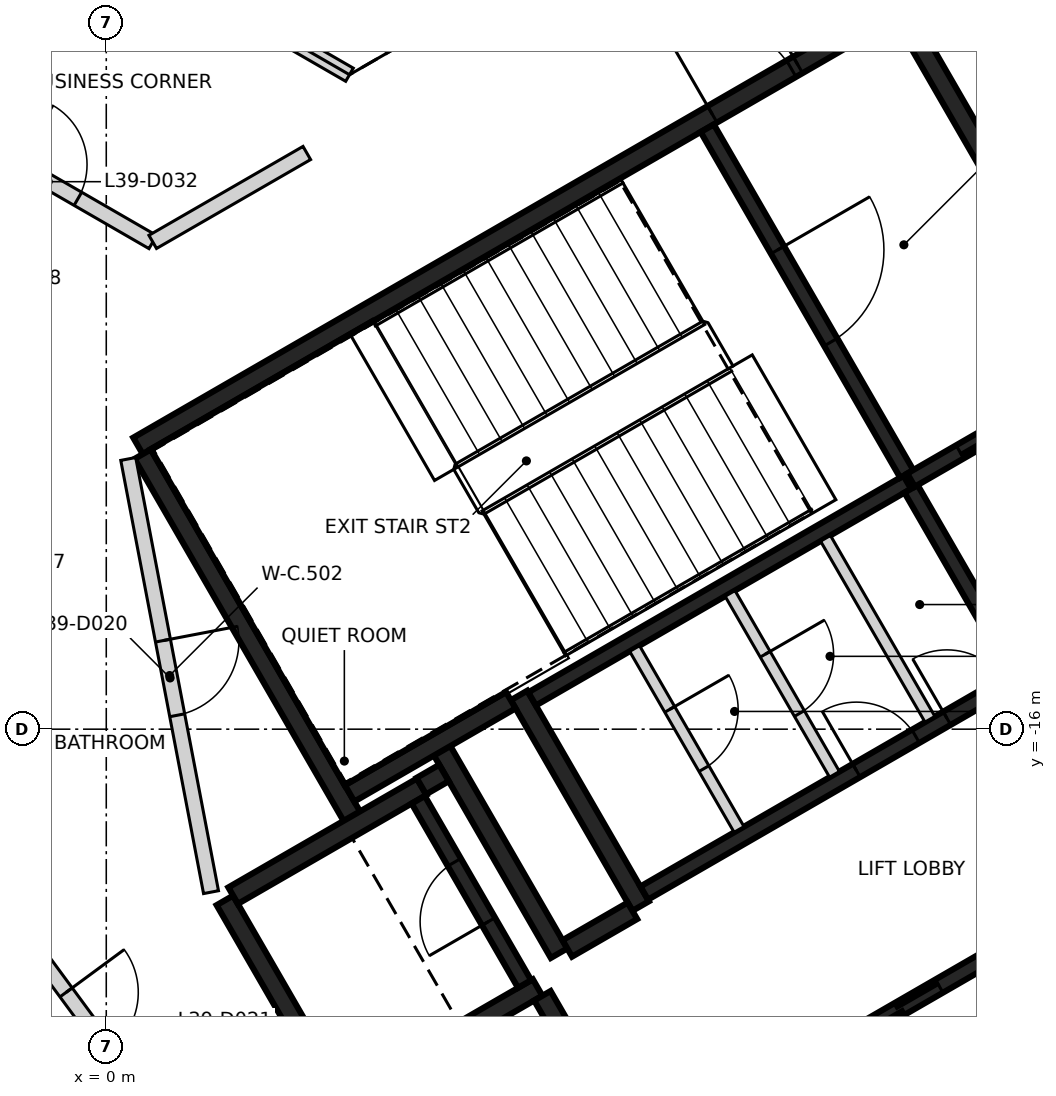
"""IFC4 building model, lengths in metres.
Left out: names, types, materials, properties, quantities, classifications, styles, units other than length and angle.
Written with IfcOpenShell. Run it as: python <this file> out.ifc"""

import sys

from ifc_helpers import new_model, si_unit, direction, frame, frame_2d, origin, place, context, subcontext, project, spatial, rectangle, extrude, element, fill, save


model = new_model("IFC4")
c1 = context("Model", 3, precision=1e-05, world=origin(), true_north=direction((0.0, 1.0)))
c2 = subcontext(c1, "Body", "Model", "MODEL_VIEW")
j1 = project(units=[si_unit("LENGTHUNIT", "METRE"), si_unit("PLANEANGLEUNIT", "RADIAN")], contexts=[c1])
p1 = place(None, origin())
s1 = spatial("IfcSite", under=j1, at=p1, CompositionType="ELEMENT")
p2 = place(p1, origin())
s2 = spatial("IfcBuilding", under=s1, at=p2, CompositionType="ELEMENT")
p3 = place(p2, frame((0.0, 0.0, 157.6)))
s3 = spatial("IfcBuildingStorey", under=s2, at=p3, CompositionType="ELEMENT", Elevation=157.6)
p4 = place(p3, frame((0.417, -12.273, 0.0), z_axis=(0.0, 0.0, 1.0), x_axis=(0.866021906294, 0.500006057782, 0.0)))
e1 = element("IfcWall", 1, at=p4, inside=s3, PredefinedType="SHEAR", context=c2, shape_type="SweptSolid", body=[
    extrude(rectangle(XDim=11.55, YDim=0.25, at=frame_2d((5.775, 0.0))), origin(), (0.0, 0.0, 1.0), 3.2),
])
p5 = place(p4, frame((10.025, 0.0, 0.0)))
e2 = element("IfcOpeningElement", 2, at=p5, cuts=e1, PredefinedType="OPENING", context=c2, shape_type="SweptSolid", body=[
    extrude(rectangle(XDim=1.2, YDim=2.1, at=frame_2d((0.6, 1.05))), frame((0.0, 0.135, 0.0), z_axis=(0.0, -1.0, 0.0), x_axis=(1.0, 0.0, 0.0)), (0.0, 0.0, 1.0), 0.27),
])
p6 = place(p4, frame((8.725, 0.0, 0.0)))
e3 = element("IfcOpeningElement", 3, at=p6, cuts=e1, PredefinedType="OPENING", context=c2, shape_type="SweptSolid", body=[
    extrude(rectangle(XDim=1.2, YDim=2.1, at=frame_2d((0.6, 1.05))), frame((0.0, 0.135, 0.0), z_axis=(0.0, -1.0, 0.0), x_axis=(1.0, 0.0, 0.0)), (0.0, 0.0, 1.0), 0.27),
])
p7 = place(p3, frame((3.235, -17.153, 0.0), z_axis=(0.0, 0.0, 1.0), x_axis=(-0.500008851346, 0.866020293397, 0.0)))
e4 = element("IfcWall", 4, at=p7, inside=s3, PredefinedType="SHEAR", context=c2, shape_type="SweptSolid", body=[
    extrude(rectangle(XDim=5.51, YDim=0.25, at=frame_2d((2.755, 0.0))), origin(), (0.0, 0.0, 1.0), 3.2),
])
p8 = place(p3, frame((10.483, -6.606, 0.0), z_axis=(0.0, 0.0, 1.0), x_axis=(0.49999885962, -0.866026062182, 0.0)))
e5 = element("IfcWall", 5, at=p8, inside=s3, PredefinedType="SHEAR", context=c2, shape_type="SweptSolid", body=[
    extrude(rectangle(XDim=5.225, YDim=0.25, at=frame_2d((2.612, 0.0))), origin(), (0.0, 0.0, 1.0), 3.2),
])
p9 = place(p3, frame((7.031, -18.327, 0.0), z_axis=(0.0, 0.0, 1.0), x_axis=(-0.499971222258, 0.866042017984, 0.0)))
e6 = element("IfcWall", 6, at=p9, inside=s3, PredefinedType="SHEAR", context=c2, shape_type="SweptSolid", body=[
    extrude(rectangle(XDim=3.2, YDim=0.25, at=frame_2d((1.6, 0.0))), origin(), (0.0, 0.0, 1.0), 3.2),
])
p10 = place(p3, frame((3.085, -20.894, 0.0), z_axis=(0.0, 0.0, 1.0), x_axis=(-0.499978833458, 0.866037623948, 0.0)))
e7 = element("IfcWall", 7, at=p10, inside=s3, PredefinedType="SHEAR", context=c2, shape_type="SweptSolid", body=[
    extrude(rectangle(XDim=3.05, YDim=0.25, at=frame_2d((1.525, 0.0))), origin(), (0.0, 0.0, 1.0), 3.2),
])
p11 = place(p3, frame((1.669, -18.19, 0.0), z_axis=(0.0, 0.0, 1.0), x_axis=(0.866042235819, 0.499970844928, 0.0)))
e8 = element("IfcWall", 8, at=p11, inside=s3, PredefinedType="SHEAR", context=c2, shape_type="SweptSolid", body=[
    extrude(rectangle(XDim=2.865, YDim=0.25, at=frame_2d((1.432, 0.0))), origin(), (0.0, 0.0, 1.0), 3.2),
])
p12 = place(p3, frame((5.675, -19.399, 0.0), z_axis=(0.0, 0.0, 1.0), x_axis=(-0.866026637627, -0.499997862916, 0.0)))
e9 = element("IfcWall", 9, at=p12, inside=s3, PredefinedType="SHEAR", context=c2, shape_type="SweptSolid", body=[
    extrude(rectangle(XDim=2.865, YDim=0.25, at=frame_2d((1.432, 0.0))), origin(), (0.0, 0.0, 1.0), 3.2),
])
p13 = place(p3, frame((4.414, -16.276, 0.0), z_axis=(0.0, 0.0, 1.0), x_axis=(0.500003324108, -0.866023484601, 0.0)))
e10 = element("IfcWall", 10, at=p13, inside=s3, PredefinedType="SHEAR", context=c2, shape_type="SweptSolid", body=[
    extrude(rectangle(XDim=3.085, YDim=0.25, at=frame_2d((1.542, 0.0))), origin(), (0.0, 0.0, 1.0), 3.2),
])
p14 = place(p3, frame((5.322, -15.619, 0.0), z_axis=(0.0, 0.0, 1.0), x_axis=(-0.866026229868, -0.499998569178, 0.0)))
e11 = element("IfcWall", 11, at=p14, inside=s3, PredefinedType="SHEAR", context=c2, shape_type="SweptSolid", body=[
    extrude(rectangle(XDim=2.449, YDim=0.25, at=frame_2d((1.225, 0.0))), origin(), (0.0, 0.0, 1.0), 3.2),
])
p15 = place(p3, frame((6.065, -18.885, 0.0), z_axis=(0.0, 0.0, 1.0), x_axis=(0.866017078145, 0.500014420154, 0.0)))
e12 = element("IfcWall", 12, at=p15, inside=s3, PredefinedType="SHEAR", context=c2, shape_type="SweptSolid", body=[
    extrude(rectangle(XDim=0.989, YDim=0.25, at=frame_2d((0.495, 0.0))), origin(), (0.0, 0.0, 1.0), 3.2),
])
p16 = place(p3, frame((6.08, -20.1, 0.0), z_axis=(0.0, 0.0, 1.0), x_axis=(-0.500051773299, 0.865995510393, 0.0)))
e13 = element("IfcWall", 13, at=p16, inside=s3, PredefinedType="SHEAR", context=c2, shape_type="SweptSolid", body=[
    extrude(rectangle(XDim=0.685, YDim=0.25, at=frame_2d((0.342, 0.0))), origin(), (0.0, 0.0, 1.0), 3.2),
])
p17 = place(p3, frame((4.145, -16.749, 0.0), z_axis=(0.0, 0.0, 1.0), x_axis=(0.866185586049, 0.49972245349, 0.0)))
e14 = element("IfcWall", 14, at=p17, inside=s3, PredefinedType="SHEAR", context=c2, shape_type="SweptSolid", body=[
    extrude(rectangle(XDim=0.344, YDim=0.25, at=frame_2d((0.172, 0.0))), origin(), (0.0, 0.0, 1.0), 3.2),
])
p18 = place(p3, frame((9.052, -20.48, 0.0), z_axis=(0.0, 0.0, 1.0), x_axis=(0.866030299012, 0.499991521122, 0.0)))
e15 = element("IfcWall", 15, at=p18, inside=s3, PredefinedType="SHEAR", context=c2, shape_type="SweptSolid", body=[
    extrude(rectangle(XDim=6.1, YDim=0.2, at=frame_2d((3.05, 0.0))), origin(), (0.0, 0.0, 1.0), 3.2),
])
p19 = place(p18, frame((1.0, 0.0, 0.0)))
e16 = element("IfcOpeningElement", 16, at=p19, cuts=e15, PredefinedType="OPENING", context=c2, shape_type="SweptSolid", body=[
    extrude(rectangle(XDim=1.2, YDim=2.1, at=frame_2d((0.6, 1.05))), frame((0.0, 0.11, 0.0), z_axis=(0.0, -1.0, 0.0), x_axis=(1.0, 0.0, 0.0)), (0.0, 0.0, 1.0), 0.22),
])
p20 = place(p18, frame((4.05, 0.0, 0.0)))
e17 = element("IfcOpeningElement", 17, at=p20, cuts=e15, PredefinedType="OPENING", context=c2, shape_type="SweptSolid", body=[
    extrude(rectangle(XDim=1.2, YDim=2.1, at=frame_2d((0.6, 1.05))), frame((0.0, 0.11, 0.0), z_axis=(0.0, -1.0, 0.0), x_axis=(1.0, 0.0, 0.0)), (0.0, 0.0, 1.0), 0.22),
])
p21 = place(p3, frame((10.538, -12.752, 0.0), z_axis=(0.0, 0.0, 1.0), x_axis=(-0.866038630372, -0.499977090179, 0.0)))
e18 = element("IfcWall", 18, at=p21, inside=s3, PredefinedType="SHEAR", context=c2, shape_type="SweptSolid", body=[
    extrude(rectangle(XDim=5.699, YDim=0.2, at=frame_2d((2.85, 0.0))), origin(), (0.0, 0.0, 1.0), 3.2),
])
p22 = place(p3, frame((7.077, -18.156, 0.0), z_axis=(0.0, 0.0, 1.0), x_axis=(0.866038630372, 0.499977090179, 0.0)))
e19 = element("IfcWall", 19, at=p22, inside=s3, PredefinedType="SHEAR", context=c2, shape_type="SweptSolid", body=[
    extrude(rectangle(XDim=5.699, YDim=0.2, at=frame_2d((2.85, 0.0))), origin(), (0.0, 0.0, 1.0), 3.2),
])
p23 = place(p22, frame((3.224, 0.0, 0.0)))
e20 = element("IfcOpeningElement", 20, at=p23, cuts=e19, PredefinedType="OPENING", context=c2, shape_type="SweptSolid", body=[
    extrude(rectangle(XDim=0.9, YDim=2.1, at=frame_2d((0.45, 1.05))), frame((0.0, 0.11, 0.0), z_axis=(0.0, -1.0, 0.0), x_axis=(1.0, 0.0, 0.0)), (0.0, 0.0, 1.0), 0.22),
])
p24 = place(p22, frame((4.599, 0.0, 0.0)))
e21 = element("IfcOpeningElement", 21, at=p24, cuts=e19, PredefinedType="OPENING", context=c2, shape_type="SweptSolid", body=[
    extrude(rectangle(XDim=0.9, YDim=2.1, at=frame_2d((0.45, 1.05))), frame((0.0, 0.11, 0.0), z_axis=(0.0, -1.0, 0.0), x_axis=(1.0, 0.0, 0.0)), (0.0, 0.0, 1.0), 0.22),
])
p25 = place(p3, frame((7.906, -8.094, 0.0), z_axis=(0.0, 0.0, 1.0), x_axis=(0.500024287448, -0.866011380966, 0.0)))
e22 = element("IfcWall", 22, at=p25, inside=s3, PredefinedType="SHEAR", context=c2, shape_type="SweptSolid", body=[
    extrude(rectangle(XDim=5.251, YDim=0.2, at=frame_2d((2.625, 0.0))), origin(), (0.0, 0.0, 1.0), 3.2),
])
p26 = place(p25, frame((1.849, 0.0, 0.0)))
e23 = element("IfcOpeningElement", 23, at=p26, cuts=e22, PredefinedType="OPENING", context=c2, shape_type="SweptSolid", body=[
    extrude(rectangle(XDim=1.4, YDim=2.1, at=frame_2d((0.7, 1.05))), frame((0.0, 0.11, 0.0), z_axis=(0.0, -1.0, 0.0), x_axis=(1.0, 0.0, 0.0)), (0.0, 0.0, 1.0), 0.22),
])
p27 = place(p3, frame((5.503, -19.352, 0.0), z_axis=(0.0, 0.0, 1.0), x_axis=(-0.499986818241, 0.866033014143, 0.0)))
e24 = element("IfcWall", 24, at=p27, inside=s3, PredefinedType="SHEAR", context=c2, shape_type="SweptSolid", body=[
    extrude(rectangle(XDim=2.798, YDim=0.2, at=frame_2d((1.399, 0.0))), origin(), (0.0, 0.0, 1.0), 3.2),
])
p28 = place(p27, frame((0.949, 0.0, 0.0)))
e25 = element("IfcOpeningElement", 25, at=p28, cuts=e24, PredefinedType="OPENING", context=c2, shape_type="SweptSolid", body=[
    extrude(rectangle(XDim=0.9, YDim=2.1, at=frame_2d((0.45, 1.05))), frame((0.0, 0.11, 0.0), z_axis=(0.0, -1.0, 0.0), x_axis=(1.0, 0.0, 0.0)), (0.0, 0.0, 1.0), 0.22),
])
p29 = place(p3, frame((11.963, -15.22, 0.0), z_axis=(0.0, 0.0, 1.0), x_axis=(-0.500034990121, 0.866005201286, 0.0)))
e26 = element("IfcWall", 26, at=p29, inside=s3, PredefinedType="SHEAR", context=c2, shape_type="SweptSolid", body=[
    extrude(rectangle(XDim=2.75, YDim=0.2, at=frame_2d((1.375, 0.0))), origin(), (0.0, 0.0, 1.0), 3.2),
])
p30 = place(p3, frame((10.587, -12.723, 0.0), z_axis=(0.0, 0.0, 1.0), x_axis=(0.866037306777, 0.499979382845, 0.0)))
e27 = element("IfcWall", 27, at=p30, inside=s3, PredefinedType="SHEAR", context=c2, shape_type="SweptSolid", body=[
    extrude(rectangle(XDim=2.742, YDim=0.2, at=frame_2d((1.371, 0.0))), origin(), (0.0, 0.0, 1.0), 3.2),
])
p31 = place(p30, frame((0.743, 0.0, 0.0)))
e28 = element("IfcOpeningElement", 28, at=p31, cuts=e27, PredefinedType="OPENING", context=c2, shape_type="SweptSolid", body=[
    extrude(rectangle(XDim=1.3, YDim=2.1, at=frame_2d((0.65, 1.05))), frame((0.0, 0.11, 0.0), z_axis=(0.0, -1.0, 0.0), x_axis=(1.0, 0.0, 0.0)), (0.0, 0.0, 1.0), 0.22),
])
p32 = place(p3, frame((8.207, -14.214, 0.0), z_axis=(0.0, 0.0, 1.0), x_axis=(0.50002746344, -0.86600954718, 0.0)))
e29 = element("IfcWall", 29, at=p32, inside=s3, PredefinedType="PARTITIONING", context=c2, shape_type="SweptSolid", body=[
    extrude(rectangle(XDim=2.748, YDim=0.15, at=frame_2d((1.374, 0.0))), origin(), (0.0, 0.0, 1.0), 3.2),
])
p33 = place(p32, frame((0.924, 0.0, 0.0)))
e30 = element("IfcOpeningElement", 30, at=p33, cuts=e29, PredefinedType="OPENING", context=c2, shape_type="SweptSolid", body=[
    extrude(rectangle(XDim=0.9, YDim=2.1, at=frame_2d((0.45, 1.05))), frame((0.0, 0.085, 0.0), z_axis=(0.0, -1.0, 0.0), x_axis=(1.0, 0.0, 0.0)), (0.0, 0.0, 1.0), 0.17),
])
p34 = place(p3, frame((9.462, -13.489, 0.0), z_axis=(0.0, 0.0, 1.0), x_axis=(0.499988999718, -0.866031754707, 0.0)))
e31 = element("IfcWall", 31, at=p34, inside=s3, PredefinedType="PARTITIONING", context=c2, shape_type="SweptSolid", body=[
    extrude(rectangle(XDim=2.749, YDim=0.15, at=frame_2d((1.374, 0.0))), origin(), (0.0, 0.0, 1.0), 3.2),
])
p35 = place(p3, frame((6.951, -14.939, 0.0), z_axis=(0.0, 0.0, 1.0), x_axis=(0.499988999718, -0.866031754707, 0.0)))
e32 = element("IfcWall", 32, at=p35, inside=s3, PredefinedType="PARTITIONING", context=c2, shape_type="SweptSolid", body=[
    extrude(rectangle(XDim=2.749, YDim=0.15, at=frame_2d((1.374, 0.0))), origin(), (0.0, 0.0, 1.0), 3.2),
])
p36 = place(p35, frame((0.924, 0.0, 0.0)))
e33 = element("IfcOpeningElement", 33, at=p36, cuts=e32, PredefinedType="OPENING", context=c2, shape_type="SweptSolid", body=[
    extrude(rectangle(XDim=0.9, YDim=2.1, at=frame_2d((0.45, 1.05))), frame((0.0, 0.085, 0.0), z_axis=(0.0, -1.0, 0.0), x_axis=(1.0, 0.0, 0.0)), (0.0, 0.0, 1.0), 0.17),
])
p37 = place(p3, frame((-8.612, -4.265, 0.0), z_axis=(0.0, 0.0, 1.0), x_axis=(0.865984415152, -0.500070987675, 0.0)))
e34 = element("IfcWall", 34, at=p37, inside=s3, PredefinedType="PARTITIONING", context=c2, shape_type="SweptSolid", body=[
    extrude(rectangle(XDim=10.651, YDim=0.2, at=frame_2d((5.326, 0.0))), origin(), (0.0, 0.0, 1.0), 3.2),
])
p38 = place(p37, frame((1.138, 0.0, 0.0)))
e35 = element("IfcOpeningElement", 35, at=p38, cuts=e34, PredefinedType="OPENING", context=c2, shape_type="SweptSolid", body=[
    extrude(rectangle(XDim=0.9, YDim=2.1, at=frame_2d((0.45, 1.05))), frame((0.0, 0.11, 0.0), z_axis=(0.0, -1.0, 0.0), x_axis=(1.0, 0.0, 0.0)), (0.0, 0.0, 1.0), 0.22),
])
p39 = place(p37, frame((4.876, 0.0, 0.0)))
e36 = element("IfcOpeningElement", 36, at=p39, cuts=e34, PredefinedType="OPENING", context=c2, shape_type="SweptSolid", body=[
    extrude(rectangle(XDim=0.9, YDim=2.1, at=frame_2d((0.45, 1.05))), frame((0.0, 0.11, 0.0), z_axis=(0.0, -1.0, 0.0), x_axis=(1.0, 0.0, 0.0)), (0.0, 0.0, 1.0), 0.22),
])
p40 = place(p37, frame((8.613, 0.0, 0.0)))
e37 = element("IfcOpeningElement", 37, at=p40, cuts=e34, PredefinedType="OPENING", context=c2, shape_type="SweptSolid", body=[
    extrude(rectangle(XDim=0.9, YDim=2.1, at=frame_2d((0.45, 1.05))), frame((0.0, 0.11, 0.0), z_axis=(0.0, -1.0, 0.0), x_axis=(1.0, 0.0, 0.0)), (0.0, 0.0, 1.0), 0.22),
])
p41 = place(p3, frame((-0.858, -19.016, 0.0), z_axis=(0.0, 0.0, 1.0), x_axis=(0.593123867414, -0.805111220829, 0.0)))
e38 = element("IfcWall", 38, at=p41, inside=s3, PredefinedType="PARTITIONING", context=c2, shape_type="SweptSolid", body=[
    extrude(rectangle(XDim=2.77, YDim=0.2, at=frame_2d((1.385, 0.0))), origin(), (0.0, 0.0, 1.0), 3.2),
])
p42 = place(p41, frame((0.555, 0.0, 0.0)))
e39 = element("IfcOpeningElement", 39, at=p42, cuts=e38, PredefinedType="OPENING", context=c2, shape_type="SweptSolid", body=[
    extrude(rectangle(XDim=0.95, YDim=2.1, at=frame_2d((0.475, 1.05))), frame((0.0, 0.11, 0.0), z_axis=(0.0, -1.0, 0.0), x_axis=(1.0, 0.0, 0.0)), (0.0, 0.0, 1.0), 0.22),
])
p43 = place(p3, frame((0.289, -12.445, 0.0), z_axis=(0.0, 0.0, 1.0), x_axis=(0.187668946952, -0.982232338273, 0.0)))
e40 = element("IfcWall", 40, at=p43, inside=s3, PredefinedType="PARTITIONING", context=c2, shape_type="SweptSolid", body=[
    extrude(rectangle(XDim=5.802, YDim=0.2, at=frame_2d((2.901, 0.0))), origin(), (0.0, 0.0, 1.0), 3.2),
])
p44 = place(p43, frame((2.433, 0.0, 0.0)))
e41 = element("IfcOpeningElement", 41, at=p44, cuts=e40, PredefinedType="OPENING", context=c2, shape_type="SweptSolid", body=[
    extrude(rectangle(XDim=1.0, YDim=2.1, at=frame_2d((0.5, 1.05))), frame((0.0, 0.11, 0.0), z_axis=(0.0, -1.0, 0.0), x_axis=(1.0, 0.0, 0.0)), (0.0, 0.0, 1.0), 0.22),
])
p45 = place(p3, frame((0.611, -9.589, 0.0), z_axis=(0.0, 0.0, 1.0), x_axis=(0.866220316572, 0.499662249082, 0.0)))
e42 = element("IfcWall", 42, at=p45, inside=s3, PredefinedType="PARTITIONING", context=c2, shape_type="SweptSolid", body=[
    extrude(rectangle(XDim=2.34, YDim=0.2, at=frame_2d((1.17, 0.0))), origin(), (0.0, 0.0, 1.0), 3.2),
])
p46 = place(p3, frame((-8.0, -0.924, 0.0), z_axis=(0.0, 0.0, 1.0), x_axis=(0.86604129137, -0.499972480886, 0.0)))
e43 = element("IfcWall", 43, at=p46, inside=s3, PredefinedType="PARTITIONING", context=c2, shape_type="SweptSolid", body=[
    extrude(rectangle(XDim=12.932, YDim=0.2, at=frame_2d((6.466, 0.0))), origin(), (0.0, 0.0, 1.0), 2.3),
])
p47 = place(p3, frame((-2.128, -8.009, 0.0), z_axis=(0.0, 0.0, 1.0), x_axis=(0.499986558861, 0.866033163891, 0.0)))
e44 = element("IfcWall", 44, at=p47, inside=s3, PredefinedType="PARTITIONING", context=c2, shape_type="SweptSolid", body=[
    extrude(rectangle(XDim=3.201, YDim=0.2, at=frame_2d((1.6, 0.0))), origin(), (0.0, 0.0, 1.0), 2.3),
])
p48 = place(p31, origin())
e45 = element("IfcDoor", 45, at=p48, inside=s3, OperationType="SLIDING_TO_RIGHT", PredefinedType="DOOR", context=c2, shape_type="SweptSolid", body=[
    extrude(rectangle(XDim=1.3, YDim=2.1, at=frame_2d((0.65, 1.05))), frame((0.0, 0.025, 0.0), z_axis=(0.0, -1.0, 0.0), x_axis=(1.0, 0.0, 0.0)), (0.0, 0.0, 1.0), 0.05),
])
fill(e28, e45)
p49 = place(p19, origin())
e46 = element("IfcDoor", 46, at=p49, inside=s3, OperationType="DOUBLE_DOOR_SLIDING", PredefinedType="DOOR", context=c2, shape_type="SweptSolid", body=[
    extrude(rectangle(XDim=1.2, YDim=2.1, at=frame_2d((0.6, 1.05))), frame((0.0, 0.025, 0.0), z_axis=(0.0, -1.0, 0.0), x_axis=(1.0, 0.0, 0.0)), (0.0, 0.0, 1.0), 0.05),
])
fill(e16, e46)
p50 = place(p5, origin())
e47 = element("IfcDoor", 47, at=p50, inside=s3, OperationType="SINGLE_SWING_LEFT", PredefinedType="DOOR", context=c2, shape_type="SweptSolid", body=[
    extrude(rectangle(XDim=1.2, YDim=2.1, at=frame_2d((0.6, 1.05))), frame((0.0, 0.025, 0.0), z_axis=(0.0, -1.0, 0.0), x_axis=(1.0, 0.0, 0.0)), (0.0, 0.0, 1.0), 0.05),
])
fill(e2, e47)
p51 = place(p6, origin())
e48 = element("IfcDoor", 48, at=p51, inside=s3, OperationType="SINGLE_SWING_RIGHT", PredefinedType="DOOR", context=c2, shape_type="SweptSolid", body=[
    extrude(rectangle(XDim=1.2, YDim=2.1, at=frame_2d((0.6, 1.05))), frame((0.0, 0.025, 0.0), z_axis=(0.0, -1.0, 0.0), x_axis=(1.0, 0.0, 0.0)), (0.0, 0.0, 1.0), 0.05),
])
fill(e3, e48)
p52 = place(p26, origin())
e49 = element("IfcDoor", 49, at=p52, inside=s3, OperationType="SINGLE_SWING_RIGHT", PredefinedType="DOOR", context=c2, shape_type="SweptSolid", body=[
    extrude(rectangle(XDim=1.4, YDim=2.1, at=frame_2d((0.7, 1.05))), frame((0.0, 0.025, 0.0), z_axis=(0.0, -1.0, 0.0), x_axis=(1.0, 0.0, 0.0)), (0.0, 0.0, 1.0), 0.05),
])
fill(e23, e49)
p53 = place(p23, origin())
e50 = element("IfcDoor", 50, at=p53, inside=s3, OperationType="SINGLE_SWING_LEFT", PredefinedType="DOOR", context=c2, shape_type="SweptSolid", body=[
    extrude(rectangle(XDim=0.9, YDim=2.1, at=frame_2d((0.45, 1.05))), frame((0.0, 0.025, 0.0), z_axis=(0.0, -1.0, 0.0), x_axis=(1.0, 0.0, 0.0)), (0.0, 0.0, 1.0), 0.05),
])
fill(e20, e50)
p54 = place(p24, origin())
e51 = element("IfcDoor", 51, at=p54, inside=s3, OperationType="SINGLE_SWING_RIGHT", PredefinedType="DOOR", context=c2, shape_type="SweptSolid", body=[
    extrude(rectangle(XDim=0.9, YDim=2.1, at=frame_2d((0.45, 1.05))), frame((0.0, 0.025, 0.0), z_axis=(0.0, -1.0, 0.0), x_axis=(1.0, 0.0, 0.0)), (0.0, 0.0, 1.0), 0.05),
])
fill(e21, e51)
p55 = place(p28, origin())
e52 = element("IfcDoor", 52, at=p55, inside=s3, OperationType="SINGLE_SWING_LEFT", PredefinedType="DOOR", context=c2, shape_type="SweptSolid", body=[
    extrude(rectangle(XDim=0.9, YDim=2.1, at=frame_2d((0.45, 1.05))), frame((0.0, 0.025, 0.0), z_axis=(0.0, -1.0, 0.0), x_axis=(1.0, 0.0, 0.0)), (0.0, 0.0, 1.0), 0.05),
])
fill(e25, e52)
p56 = place(p33, origin())
e53 = element("IfcDoor", 53, at=p56, inside=s3, OperationType="SINGLE_SWING_RIGHT", PredefinedType="DOOR", context=c2, shape_type="SweptSolid", body=[
    extrude(rectangle(XDim=0.9, YDim=2.1, at=frame_2d((0.45, 1.05))), frame((0.0, 0.025, 0.0), z_axis=(0.0, -1.0, 0.0), x_axis=(1.0, 0.0, 0.0)), (0.0, 0.0, 1.0), 0.05),
])
fill(e30, e53)
p57 = place(p36, origin())
e54 = element("IfcDoor", 54, at=p57, inside=s3, OperationType="SINGLE_SWING_LEFT", PredefinedType="DOOR", context=c2, shape_type="SweptSolid", body=[
    extrude(rectangle(XDim=0.9, YDim=2.1, at=frame_2d((0.45, 1.05))), frame((0.0, 0.025, 0.0), z_axis=(0.0, -1.0, 0.0), x_axis=(1.0, 0.0, 0.0)), (0.0, 0.0, 1.0), 0.05),
])
fill(e33, e54)
p58 = place(p44, origin())
e55 = element("IfcDoor", 55, at=p58, inside=s3, OperationType="SINGLE_SWING_LEFT", PredefinedType="DOOR", context=c2, shape_type="SweptSolid", body=[
    extrude(rectangle(XDim=1.0, YDim=2.1, at=frame_2d((0.5, 1.05))), frame((0.0, 0.025, 0.0), z_axis=(0.0, -1.0, 0.0), x_axis=(1.0, 0.0, 0.0)), (0.0, 0.0, 1.0), 0.05),
])
fill(e41, e55)
p59 = place(p42, frame((0.95, 0.0, 0.0), z_axis=(0.0, 0.0, 1.0), x_axis=(-1.0, 0.0, 0.0)))
e56 = element("IfcDoor", 56, at=p59, inside=s3, OperationType="SINGLE_SWING_LEFT", PredefinedType="DOOR", context=c2, shape_type="SweptSolid", body=[
    extrude(rectangle(XDim=0.95, YDim=2.1, at=frame_2d((0.475, 1.05))), frame((0.0, 0.025, 0.0), z_axis=(0.0, -1.0, 0.0), x_axis=(1.0, 0.0, 0.0)), (0.0, 0.0, 1.0), 0.05),
])
fill(e39, e56)
p60 = place(p40, origin())
e57 = element("IfcDoor", 57, at=p60, inside=s3, OperationType="SINGLE_SWING_LEFT", PredefinedType="DOOR", context=c2, shape_type="SweptSolid", body=[
    extrude(rectangle(XDim=0.9, YDim=2.1, at=frame_2d((0.45, 1.05))), frame((0.0, 0.025, 0.0), z_axis=(0.0, -1.0, 0.0), x_axis=(1.0, 0.0, 0.0)), (0.0, 0.0, 1.0), 0.05),
])
fill(e37, e57)
save(model, sys.argv[1])
